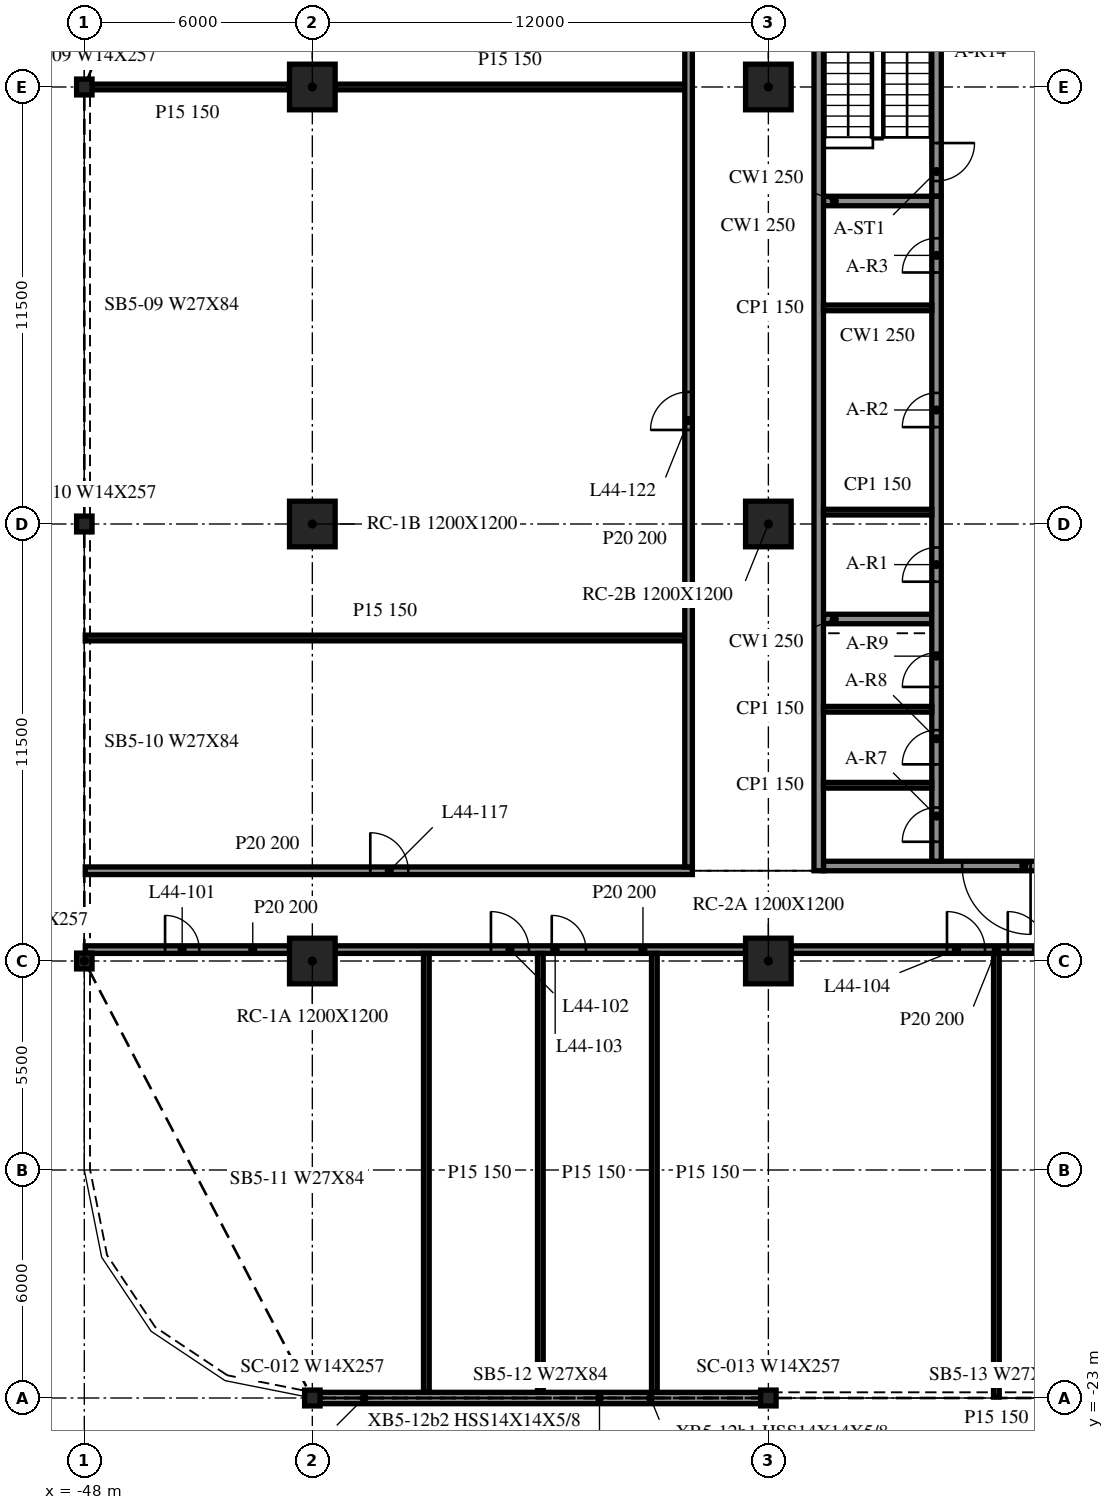
"""IFC4 building model, lengths in metres.
Left out: names, types, materials, properties, quantities, classifications, styles, units other than length and angle.
Written with IfcOpenShell. Run it as: python <this file> out.ifc"""

import sys

from ifc_helpers import new_model, si_unit, direction, frame, frame_2d, origin, origin_2d, place, context, subcontext, project, spatial, rectangle, i_section, extrude, element, fill, save


model = new_model("IFC4")
c1 = context("Model", 3, precision=1e-05, world=origin(), true_north=direction((0.0, 1.0)))
c2 = subcontext(c1, "Body", "Model", "MODEL_VIEW")
j1 = project(units=[si_unit("LENGTHUNIT", "METRE"), si_unit("PLANEANGLEUNIT", "RADIAN")], contexts=[c1])
p1 = place(None, origin())
s1 = spatial("IfcSite", under=j1, at=p1, CompositionType="ELEMENT")
p2 = place(p1, origin())
s2 = spatial("IfcBuilding", under=s1, at=p2, CompositionType="ELEMENT")
p3 = place(p2, frame((0.0, 0.0, 185.8)))
s3 = spatial("IfcBuildingStorey", under=s2, at=p3, CompositionType="ELEMENT", Elevation=185.8)
for number, where, z_axis, x_axis in (
    (1, (-42.0, -11.5, -0.34), (0.0, 0.0, 1.0), (1.0, 0.0, 0.0)),
    (2, (-42.0, 0.0, -0.34), (0.0, 0.0, 1.0), (1.0, 0.0, 0.0)),
    (3, (-42.0, 11.5, -0.34), (0.0, 0.0, 1.0), (1.0, 0.0, 0.0)),
    (4, (-30.0, -11.5, -0.34), (0.0, 0.0, 1.0), (1.0, 0.0, 0.0)),
    (5, (-30.0, 0.0, -0.34), (0.0, 0.0, 1.0), (1.0, 0.0, 0.0)),
    (6, (-30.0, 11.5, -0.34), (0.0, 0.0, 1.0), (1.0, 0.0, 0.0)),
):
    element("IfcColumn", number, at=place(p3, frame(where, z_axis=z_axis, x_axis=x_axis)), inside=s3, PredefinedType="COLUMN", context=c2, shape_type="SweptSolid", body=[
        extrude(rectangle(XDim=1.2, YDim=1.2, at=origin_2d()), origin(), (0.0, 0.0, 1.0), 3.74),
    ])
for number, where, z_axis, x_axis in (
    (7, (-48.0, 11.5, -0.34), (0.0, 0.0, 1.0), (1.0, 0.0, 0.0)),
    (8, (-48.0, 0.0, -0.34), (0.0, 0.0, 1.0), (1.0, 0.0, 0.0)),
    (9, (-48.0, -11.5, -0.34), (0.0, 0.0, 1.0), (1.0, 0.0, 0.0)),
    (10, (-42.0, -23.0, -0.34), (0.0, 0.0, 1.0), (1.0, 0.0, 0.0)),
    (11, (-30.0, -23.0, -0.34), (0.0, 0.0, 1.0), (1.0, 0.0, 0.0)),
):
    element("IfcColumn", number, at=place(p3, frame(where, z_axis=z_axis, x_axis=x_axis)), inside=s3, PredefinedType="COLUMN", context=c2, shape_type="SweptSolid", body=[
        extrude(i_section(OverallWidth=0.406, OverallDepth=0.417, WebThickness=0.03, FlangeThickness=0.048, at=origin_2d()), origin(), (0.0, 0.0, 1.0), 3.74),
    ])
p4 = place(p3, frame((-41.985, -23.0, 0.0), z_axis=(0.0, 0.0, 1.0), x_axis=(1.0, 0.0, 0.0)))
e12 = element("IfcWall", 12, at=p4, inside=s3, PredefinedType="NOTDEFINED", context=c2, shape_type="SweptSolid", body=[
    extrude(rectangle(XDim=11.97, YDim=0.3, at=frame_2d((5.985, 0.0))), origin(), (0.0, 0.0, 1.0), 3.4),
])
p5 = place(p3, frame((-28.675, 15.125, 0.0), z_axis=(0.0, 0.0, 1.0), x_axis=(0.0, -1.0, 0.0)))
e13 = element("IfcWall", 13, at=p5, inside=s3, PredefinedType="SOLIDWALL", context=c2, shape_type="SweptSolid", body=[
    extrude(rectangle(XDim=24.25, YDim=0.25, at=frame_2d((12.125, 0.0))), origin(), (0.0, 0.0, 1.0), 3.4),
])
p6 = place(p3, frame((-19.45, -9.0, 0.0), z_axis=(0.0, 0.0, 1.0), x_axis=(-1.0, 0.0, 0.0)))
e14 = element("IfcWall", 14, at=p6, inside=s3, PredefinedType="SOLIDWALL", context=c2, shape_type="SweptSolid", body=[
    extrude(rectangle(XDim=9.1, YDim=0.25, at=frame_2d((4.55, 0.0))), origin(), (0.0, 0.0, 1.0), 3.4),
])
p7 = place(p6, frame((3.65, 0.0, 0.0)))
e15 = element("IfcOpeningElement", 15, at=p7, cuts=e14, PredefinedType="OPENING", context=c2, shape_type="SweptSolid", body=[
    extrude(rectangle(XDim=1.8, YDim=2.1, at=frame_2d((0.9, 1.05))), frame((0.0, 0.135, 0.0), z_axis=(0.0, -1.0, 0.0), x_axis=(1.0, 0.0, 0.0)), (0.0, 0.0, 1.0), 0.27),
])
p8 = place(p3, frame((-25.575, -8.875, 0.0), z_axis=(0.0, 0.0, 1.0), x_axis=(0.0, 1.0, 0.0)))
e16 = element("IfcWall", 16, at=p8, inside=s3, PredefinedType="SOLIDWALL", context=c2, shape_type="SweptSolid", body=[
    extrude(rectangle(XDim=17.5, YDim=0.25, at=frame_2d((8.75, 0.0))), origin(), (0.0, 0.0, 1.0), 3.4),
])
p9 = place(p8, frame((7.356, 0.0, 0.0)))
e17 = element("IfcOpeningElement", 17, at=p9, cuts=e16, PredefinedType="OPENING", context=c2, shape_type="SweptSolid", body=[
    extrude(rectangle(XDim=0.9, YDim=2.1, at=frame_2d((0.45, 1.05))), frame((0.0, 0.135, 0.0), z_axis=(0.0, -1.0, 0.0), x_axis=(1.0, 0.0, 0.0)), (0.0, 0.0, 1.0), 0.27),
])
p10 = place(p8, frame((11.425, 0.0, 0.0)))
e18 = element("IfcOpeningElement", 18, at=p10, cuts=e16, PredefinedType="OPENING", context=c2, shape_type="SweptSolid", body=[
    extrude(rectangle(XDim=0.9, YDim=2.1, at=frame_2d((0.45, 1.05))), frame((0.0, 0.135, 0.0), z_axis=(0.0, -1.0, 0.0), x_axis=(1.0, 0.0, 0.0)), (0.0, 0.0, 1.0), 0.27),
])
p11 = place(p8, frame((15.494, 0.0, 0.0)))
e19 = element("IfcOpeningElement", 19, at=p11, cuts=e16, PredefinedType="OPENING", context=c2, shape_type="SweptSolid", body=[
    extrude(rectangle(XDim=0.9, YDim=2.1, at=frame_2d((0.45, 1.05))), frame((0.0, 0.135, 0.0), z_axis=(0.0, -1.0, 0.0), x_axis=(1.0, 0.0, 0.0)), (0.0, 0.0, 1.0), 0.27),
])
p12 = place(p8, frame((0.512, 0.0, 0.0)))
e20 = element("IfcOpeningElement", 20, at=p12, cuts=e16, PredefinedType="OPENING", context=c2, shape_type="SweptSolid", body=[
    extrude(rectangle(XDim=0.9, YDim=2.1, at=frame_2d((0.45, 1.05))), frame((0.0, 0.135, 0.0), z_axis=(0.0, -1.0, 0.0), x_axis=(1.0, 0.0, 0.0)), (0.0, 0.0, 1.0), 0.27),
])
p13 = place(p8, frame((2.55, 0.0, 0.0)))
e21 = element("IfcOpeningElement", 21, at=p13, cuts=e16, PredefinedType="OPENING", context=c2, shape_type="SweptSolid", body=[
    extrude(rectangle(XDim=0.9, YDim=2.1, at=frame_2d((0.45, 1.05))), frame((0.0, 0.135, 0.0), z_axis=(0.0, -1.0, 0.0), x_axis=(1.0, 0.0, 0.0)), (0.0, 0.0, 1.0), 0.27),
])
p14 = place(p8, frame((4.587, 0.0, 0.0)))
e22 = element("IfcOpeningElement", 22, at=p14, cuts=e16, PredefinedType="OPENING", context=c2, shape_type="SweptSolid", body=[
    extrude(rectangle(XDim=0.9, YDim=2.1, at=frame_2d((0.45, 1.05))), frame((0.0, 0.135, 0.0), z_axis=(0.0, -1.0, 0.0), x_axis=(1.0, 0.0, 0.0)), (0.0, 0.0, 1.0), 0.27),
])
p15 = place(p3, frame((-25.575, 14.875, 0.0), z_axis=(0.0, 0.0, 1.0), x_axis=(0.0, -1.0, 0.0)))
e23 = element("IfcWall", 23, at=p15, inside=s3, PredefinedType="SOLIDWALL", context=c2, shape_type="SweptSolid", body=[
    extrude(rectangle(XDim=6.25, YDim=0.25, at=frame_2d((3.125, 0.0))), origin(), (0.0, 0.0, 1.0), 3.4),
])
p16 = place(p15, frame((4.85, 0.0, 0.0)))
e24 = element("IfcOpeningElement", 24, at=p16, cuts=e23, PredefinedType="OPENING", context=c2, shape_type="SweptSolid", body=[
    extrude(rectangle(XDim=1.0, YDim=2.1, at=frame_2d((0.5, 1.05))), frame((0.0, 0.135, 0.0), z_axis=(0.0, -1.0, 0.0), x_axis=(1.0, 0.0, 0.0)), (0.0, 0.0, 1.0), 0.27),
])
for number, where, z_axis, x_axis in (
    (25, (-28.55, -2.5, 0.0), (0.0, 0.0, 1.0), (1.0, 0.0, 0.0)),
    (26, (-28.55, 8.5, 0.0), (0.0, 0.0, 1.0), (1.0, 0.0, 0.0)),
):
    element("IfcWall", number, at=place(p3, frame(where, z_axis=z_axis, x_axis=x_axis)), inside=s3, PredefinedType="SOLIDWALL", context=c2, shape_type="SweptSolid", body=[
        extrude(rectangle(XDim=2.85, YDim=0.25, at=frame_2d((1.425, 0.0))), origin(), (0.0, 0.0, 1.0), 3.4),
    ])
for number, where, z_axis, x_axis in (
    (27, (-28.55, 0.312, 0.0), (0.0, 0.0, 1.0), (1.0, 0.0, 0.0)),
    (28, (-28.55, 5.688, 0.0), (0.0, 0.0, 1.0), (1.0, 0.0, 0.0)),
    (29, (-28.55, -6.875, 0.0), (0.0, 0.0, 1.0), (1.0, 0.0, 0.0)),
    (30, (-28.55, -4.875, 0.0), (0.0, 0.0, 1.0), (1.0, 0.0, 0.0)),
):
    element("IfcWall", number, at=place(p3, frame(where, z_axis=z_axis, x_axis=x_axis)), inside=s3, PredefinedType="PARTITIONING", context=c2, shape_type="SweptSolid", body=[
        extrude(rectangle(XDim=2.85, YDim=0.15, at=frame_2d((1.425, 0.0))), origin(), (0.0, 0.0, 1.0), 3.4),
    ])
p17 = place(p3, frame((-47.975, -11.2, 0.0), z_axis=(0.0, 0.0, 1.0), x_axis=(1.0, 0.0, 0.0)))
e31 = element("IfcWall", 31, at=p17, inside=s3, PredefinedType="PARTITIONING", context=c2, shape_type="SweptSolid", body=[
    extrude(rectangle(XDim=5.375, YDim=0.2, at=frame_2d((2.688, 0.0))), origin(), (0.0, 0.0, 1.0), 3.4),
])
p18 = place(p17, frame((2.1, 0.0, 0.0)))
e32 = element("IfcOpeningElement", 32, at=p18, cuts=e31, PredefinedType="OPENING", context=c2, shape_type="SweptSolid", body=[
    extrude(rectangle(XDim=0.9, YDim=2.1, at=frame_2d((0.45, 1.05))), frame((0.0, 0.11, 0.0), z_axis=(0.0, -1.0, 0.0), x_axis=(1.0, 0.0, 0.0)), (0.0, 0.0, 1.0), 0.22),
])
p19 = place(p3, frame((-41.4, -11.2, 0.0), z_axis=(0.0, 0.0, 1.0), x_axis=(1.0, 0.0, 0.0)))
e33 = element("IfcWall", 33, at=p19, inside=s3, PredefinedType="PARTITIONING", context=c2, shape_type="SweptSolid", body=[
    extrude(rectangle(XDim=10.8, YDim=0.2, at=frame_2d((5.4, 0.0))), origin(), (0.0, 0.0, 1.0), 3.4),
])
p20 = place(p19, frame((4.1, 0.0, 0.0)))
e34 = element("IfcOpeningElement", 34, at=p20, cuts=e33, PredefinedType="OPENING", context=c2, shape_type="SweptSolid", body=[
    extrude(rectangle(XDim=1.0, YDim=2.1, at=frame_2d((0.5, 1.05))), frame((0.0, 0.11, 0.0), z_axis=(0.0, -1.0, 0.0), x_axis=(1.0, 0.0, 0.0)), (0.0, 0.0, 1.0), 0.22),
])
p21 = place(p19, frame((5.7, 0.0, 0.0)))
e35 = element("IfcOpeningElement", 35, at=p21, cuts=e33, PredefinedType="OPENING", context=c2, shape_type="SweptSolid", body=[
    extrude(rectangle(XDim=0.9, YDim=2.1, at=frame_2d((0.45, 1.05))), frame((0.0, 0.11, 0.0), z_axis=(0.0, -1.0, 0.0), x_axis=(1.0, 0.0, 0.0)), (0.0, 0.0, 1.0), 0.22),
])
p22 = place(p3, frame((-29.4, -11.2, 0.0), z_axis=(0.0, 0.0, 1.0), x_axis=(1.0, 0.0, 0.0)))
e36 = element("IfcWall", 36, at=p22, inside=s3, PredefinedType="PARTITIONING", context=c2, shape_type="SweptSolid", body=[
    extrude(rectangle(XDim=10.8, YDim=0.2, at=frame_2d((5.4, 0.0))), origin(), (0.0, 0.0, 1.0), 3.4),
])
p23 = place(p22, frame((4.1, 0.0, 0.0)))
e37 = element("IfcOpeningElement", 37, at=p23, cuts=e36, PredefinedType="OPENING", context=c2, shape_type="SweptSolid", body=[
    extrude(rectangle(XDim=1.0, YDim=2.1, at=frame_2d((0.5, 1.05))), frame((0.0, 0.11, 0.0), z_axis=(0.0, -1.0, 0.0), x_axis=(1.0, 0.0, 0.0)), (0.0, 0.0, 1.0), 0.22),
])
p24 = place(p22, frame((5.7, 0.0, 0.0)))
e38 = element("IfcOpeningElement", 38, at=p24, cuts=e36, PredefinedType="OPENING", context=c2, shape_type="SweptSolid", body=[
    extrude(rectangle(XDim=1.0, YDim=2.1, at=frame_2d((0.5, 1.05))), frame((0.0, 0.11, 0.0), z_axis=(0.0, -1.0, 0.0), x_axis=(1.0, 0.0, 0.0)), (0.0, 0.0, 1.0), 0.22),
])
p25 = place(p3, frame((-47.975, -9.125, 0.0), z_axis=(0.0, 0.0, 1.0), x_axis=(1.0, 0.0, 0.0)))
e39 = element("IfcWall", 39, at=p25, inside=s3, PredefinedType="PARTITIONING", context=c2, shape_type="SweptSolid", body=[
    extrude(rectangle(XDim=15.975, YDim=0.2, at=frame_2d((7.988, 0.0))), origin(), (0.0, 0.0, 1.0), 3.4),
])
p26 = place(p25, frame((7.5, 0.0, 0.0)))
e40 = element("IfcOpeningElement", 40, at=p26, cuts=e39, PredefinedType="OPENING", context=c2, shape_type="SweptSolid", body=[
    extrude(rectangle(XDim=1.0, YDim=2.1, at=frame_2d((0.5, 1.05))), frame((0.0, 0.11, 0.0), z_axis=(0.0, -1.0, 0.0), x_axis=(1.0, 0.0, 0.0)), (0.0, 0.0, 1.0), 0.22),
])
p27 = place(p3, frame((-47.975, -3.0, 0.0), z_axis=(0.0, 0.0, 1.0), x_axis=(1.0, 0.0, 0.0)))
e41 = element("IfcWall", 41, at=p27, inside=s3, PredefinedType="PARTITIONING", context=c2, shape_type="SweptSolid", body=[
    extrude(rectangle(XDim=15.775, YDim=0.15, at=frame_2d((7.888, 0.0))), origin(), (0.0, 0.0, 1.0), 3.4),
])
p28 = place(p3, frame((-47.975, 11.5, 0.0), z_axis=(0.0, 0.0, 1.0), x_axis=(1.0, 0.0, 0.0)))
e42 = element("IfcWall", 42, at=p28, inside=s3, PredefinedType="PARTITIONING", context=c2, shape_type="SweptSolid", body=[
    extrude(rectangle(XDim=5.375, YDim=0.15, at=frame_2d((2.688, 0.0))), origin(), (0.0, 0.0, 1.0), 3.4),
])
p29 = place(p3, frame((-41.4, 11.5, 0.0), z_axis=(0.0, 0.0, 1.0), x_axis=(1.0, 0.0, 0.0)))
e43 = element("IfcWall", 43, at=p29, inside=s3, PredefinedType="PARTITIONING", context=c2, shape_type="SweptSolid", body=[
    extrude(rectangle(XDim=9.2, YDim=0.15, at=frame_2d((4.6, 0.0))), origin(), (0.0, 0.0, 1.0), 3.4),
])
for number, where, z_axis, x_axis in (
    (44, (-39.0, -22.85, 0.0), (0.0, 0.0, 1.0), (0.0, 1.0, 0.0)),
    (45, (-36.0, -22.85, 0.0), (0.0, 0.0, 1.0), (0.0, 1.0, 0.0)),
    (46, (-33.0, -22.85, 0.0), (0.0, 0.0, 1.0), (0.0, 1.0, 0.0)),
):
    element("IfcWall", number, at=place(p3, frame(where, z_axis=z_axis, x_axis=x_axis)), inside=s3, PredefinedType="PARTITIONING", context=c2, shape_type="SweptSolid", body=[
        extrude(rectangle(XDim=11.55, YDim=0.15, at=frame_2d((5.775, 0.0))), origin(), (0.0, 0.0, 1.0), 3.4),
    ])
p30 = place(p3, frame((-32.1, -9.025, 0.0), z_axis=(0.0, 0.0, 1.0), x_axis=(0.0, 1.0, 0.0)))
e47 = element("IfcWall", 47, at=p30, inside=s3, PredefinedType="PARTITIONING", context=c2, shape_type="SweptSolid", body=[
    extrude(rectangle(XDim=24.05, YDim=0.2, at=frame_2d((12.025, 0.0))), origin(), (0.0, 0.0, 1.0), 3.4),
])
p31 = place(p30, frame((11.5, 0.0, 0.0)))
e48 = element("IfcOpeningElement", 48, at=p31, cuts=e47, PredefinedType="OPENING", context=c2, shape_type="SweptSolid", body=[
    extrude(rectangle(XDim=1.0, YDim=2.1, at=frame_2d((0.5, 1.05))), frame((0.0, 0.11, 0.0), z_axis=(0.0, -1.0, 0.0), x_axis=(1.0, 0.0, 0.0)), (0.0, 0.0, 1.0), 0.22),
])
p32 = place(p3, frame((-24.0, -22.975, 0.0), z_axis=(0.0, 0.0, 1.0), x_axis=(0.0, 1.0, 0.0)))
e49 = element("IfcWall", 49, at=p32, inside=s3, PredefinedType="PARTITIONING", context=c2, shape_type="SweptSolid", body=[
    extrude(rectangle(XDim=11.675, YDim=0.15, at=frame_2d((5.837, 0.0))), origin(), (0.0, 0.0, 1.0), 3.4),
])
p33 = place(p7, origin())
e50 = element("IfcDoor", 50, at=p33, inside=s3, OperationType="DOUBLE_DOOR_SINGLE_SWING", PredefinedType="DOOR", context=c2, shape_type="SweptSolid", body=[
    extrude(rectangle(XDim=1.8, YDim=2.1, at=frame_2d((0.9, 1.05))), frame((0.0, 0.025, 0.0), z_axis=(0.0, -1.0, 0.0), x_axis=(1.0, 0.0, 0.0)), (0.0, 0.0, 1.0), 0.05),
])
fill(e15, e50)
p34 = place(p9, origin())
e51 = element("IfcDoor", 51, at=p34, inside=s3, OperationType="SINGLE_SWING_LEFT", PredefinedType="DOOR", context=c2, shape_type="SweptSolid", body=[
    extrude(rectangle(XDim=0.9, YDim=2.1, at=frame_2d((0.45, 1.05))), frame((0.0, 0.025, 0.0), z_axis=(0.0, -1.0, 0.0), x_axis=(1.0, 0.0, 0.0)), (0.0, 0.0, 1.0), 0.05),
])
fill(e17, e51)
p35 = place(p10, origin())
e52 = element("IfcDoor", 52, at=p35, inside=s3, OperationType="SINGLE_SWING_RIGHT", PredefinedType="DOOR", context=c2, shape_type="SweptSolid", body=[
    extrude(rectangle(XDim=0.9, YDim=2.1, at=frame_2d((0.45, 1.05))), frame((0.0, 0.025, 0.0), z_axis=(0.0, -1.0, 0.0), x_axis=(1.0, 0.0, 0.0)), (0.0, 0.0, 1.0), 0.05),
])
fill(e18, e52)
p36 = place(p11, origin())
e53 = element("IfcDoor", 53, at=p36, inside=s3, OperationType="SINGLE_SWING_LEFT", PredefinedType="DOOR", context=c2, shape_type="SweptSolid", body=[
    extrude(rectangle(XDim=0.9, YDim=2.1, at=frame_2d((0.45, 1.05))), frame((0.0, 0.025, 0.0), z_axis=(0.0, -1.0, 0.0), x_axis=(1.0, 0.0, 0.0)), (0.0, 0.0, 1.0), 0.05),
])
fill(e19, e53)
p37 = place(p12, origin())
e54 = element("IfcDoor", 54, at=p37, inside=s3, OperationType="SINGLE_SWING_LEFT", PredefinedType="DOOR", context=c2, shape_type="SweptSolid", body=[
    extrude(rectangle(XDim=0.9, YDim=2.1, at=frame_2d((0.45, 1.05))), frame((0.0, 0.025, 0.0), z_axis=(0.0, -1.0, 0.0), x_axis=(1.0, 0.0, 0.0)), (0.0, 0.0, 1.0), 0.05),
])
fill(e20, e54)
p38 = place(p13, origin())
e55 = element("IfcDoor", 55, at=p38, inside=s3, OperationType="SINGLE_SWING_RIGHT", PredefinedType="DOOR", context=c2, shape_type="SweptSolid", body=[
    extrude(rectangle(XDim=0.9, YDim=2.1, at=frame_2d((0.45, 1.05))), frame((0.0, 0.025, 0.0), z_axis=(0.0, -1.0, 0.0), x_axis=(1.0, 0.0, 0.0)), (0.0, 0.0, 1.0), 0.05),
])
fill(e21, e55)
p39 = place(p14, origin())
e56 = element("IfcDoor", 56, at=p39, inside=s3, OperationType="SINGLE_SWING_LEFT", PredefinedType="DOOR", context=c2, shape_type="SweptSolid", body=[
    extrude(rectangle(XDim=0.9, YDim=2.1, at=frame_2d((0.45, 1.05))), frame((0.0, 0.025, 0.0), z_axis=(0.0, -1.0, 0.0), x_axis=(1.0, 0.0, 0.0)), (0.0, 0.0, 1.0), 0.05),
])
fill(e22, e56)
p40 = place(p16, origin())
e57 = element("IfcDoor", 57, at=p40, inside=s3, OperationType="SINGLE_SWING_LEFT", PredefinedType="DOOR", context=c2, shape_type="SweptSolid", body=[
    extrude(rectangle(XDim=1.0, YDim=2.1, at=frame_2d((0.5, 1.05))), frame((0.0, 0.025, 0.0), z_axis=(0.0, -1.0, 0.0), x_axis=(1.0, 0.0, 0.0)), (0.0, 0.0, 1.0), 0.05),
])
fill(e24, e57)
p41 = place(p18, origin())
e58 = element("IfcDoor", 58, at=p41, inside=s3, OperationType="SINGLE_SWING_RIGHT", PredefinedType="DOOR", context=c2, shape_type="SweptSolid", body=[
    extrude(rectangle(XDim=0.9, YDim=2.1, at=frame_2d((0.45, 1.05))), frame((0.0, 0.025, 0.0), z_axis=(0.0, -1.0, 0.0), x_axis=(1.0, 0.0, 0.0)), (0.0, 0.0, 1.0), 0.05),
])
fill(e32, e58)
p42 = place(p20, origin())
e59 = element("IfcDoor", 59, at=p42, inside=s3, OperationType="SINGLE_SWING_RIGHT", PredefinedType="DOOR", context=c2, shape_type="SweptSolid", body=[
    extrude(rectangle(XDim=1.0, YDim=2.1, at=frame_2d((0.5, 1.05))), frame((0.0, 0.025, 0.0), z_axis=(0.0, -1.0, 0.0), x_axis=(1.0, 0.0, 0.0)), (0.0, 0.0, 1.0), 0.05),
])
fill(e34, e59)
p43 = place(p21, origin())
e60 = element("IfcDoor", 60, at=p43, inside=s3, OperationType="SINGLE_SWING_LEFT", PredefinedType="DOOR", context=c2, shape_type="SweptSolid", body=[
    extrude(rectangle(XDim=0.9, YDim=2.1, at=frame_2d((0.45, 1.05))), frame((0.0, 0.025, 0.0), z_axis=(0.0, -1.0, 0.0), x_axis=(1.0, 0.0, 0.0)), (0.0, 0.0, 1.0), 0.05),
])
fill(e35, e60)
p44 = place(p23, origin())
e61 = element("IfcDoor", 61, at=p44, inside=s3, OperationType="SINGLE_SWING_RIGHT", PredefinedType="DOOR", context=c2, shape_type="SweptSolid", body=[
    extrude(rectangle(XDim=1.0, YDim=2.1, at=frame_2d((0.5, 1.05))), frame((0.0, 0.025, 0.0), z_axis=(0.0, -1.0, 0.0), x_axis=(1.0, 0.0, 0.0)), (0.0, 0.0, 1.0), 0.05),
])
fill(e37, e61)
p45 = place(p24, origin())
e62 = element("IfcDoor", 62, at=p45, inside=s3, OperationType="SINGLE_SWING_LEFT", PredefinedType="DOOR", context=c2, shape_type="SweptSolid", body=[
    extrude(rectangle(XDim=1.0, YDim=2.1, at=frame_2d((0.5, 1.05))), frame((0.0, 0.025, 0.0), z_axis=(0.0, -1.0, 0.0), x_axis=(1.0, 0.0, 0.0)), (0.0, 0.0, 1.0), 0.05),
])
fill(e38, e62)
p46 = place(p26, origin())
e63 = element("IfcDoor", 63, at=p46, inside=s3, OperationType="SINGLE_SWING_RIGHT", PredefinedType="DOOR", context=c2, shape_type="SweptSolid", body=[
    extrude(rectangle(XDim=1.0, YDim=2.1, at=frame_2d((0.5, 1.05))), frame((0.0, 0.025, 0.0), z_axis=(0.0, -1.0, 0.0), x_axis=(1.0, 0.0, 0.0)), (0.0, 0.0, 1.0), 0.05),
])
fill(e40, e63)
p47 = place(p31, origin())
e64 = element("IfcDoor", 64, at=p47, inside=s3, OperationType="SINGLE_SWING_LEFT", PredefinedType="DOOR", context=c2, shape_type="SweptSolid", body=[
    extrude(rectangle(XDim=1.0, YDim=2.1, at=frame_2d((0.5, 1.05))), frame((0.0, 0.025, 0.0), z_axis=(0.0, -1.0, 0.0), x_axis=(1.0, 0.0, 0.0)), (0.0, 0.0, 1.0), 0.05),
])
fill(e48, e64)
save(model, sys.argv[1])
